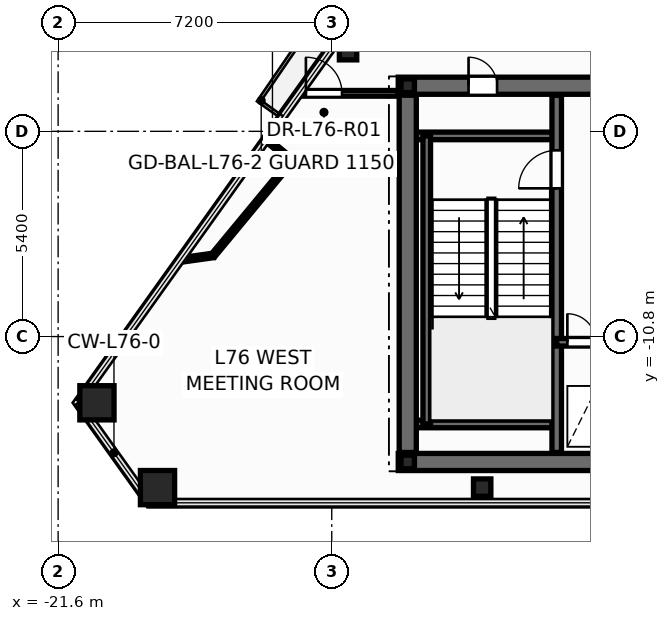
"""IFC4 building model, lengths in metres.
Left out: names, types, materials, properties, quantities, classifications, styles, units other than length and angle.
Written with IfcOpenShell. Run it as: python <this file> out.ifc"""

import sys

from ifc_helpers import new_model, si_unit, direction, frame, frame_2d, origin, origin_2d, place, context, subcontext, project, spatial, rectangle, hollow_rectangle, hollow_circle, i_section, extrude, element, fill, save


model = new_model("IFC4")
c1 = context("Model", 3, precision=1e-05, world=origin(), true_north=direction((0.0, 1.0)))
c2 = subcontext(c1, "Body", "Model", "MODEL_VIEW")
j1 = project(units=[si_unit("LENGTHUNIT", "METRE"), si_unit("PLANEANGLEUNIT", "RADIAN")], contexts=[c1])
p1 = place(None, origin())
s1 = spatial("IfcSite", under=j1, at=p1, CompositionType="ELEMENT")
p2 = place(p1, origin())
s2 = spatial("IfcBuilding", under=s1, at=p2, CompositionType="ELEMENT")
p3 = place(p2, frame((0.0, 0.0, 289.2)))
s3 = spatial("IfcBuildingStorey", under=s2, at=p3, CompositionType="ELEMENT", Elevation=289.2)
for number, where, z_axis, x_axis in (
    (1, (-20.579, -12.543, 0.0), (0.0, 0.0, 1.0), (1.0, 0.0, 0.0)),
    (2, (-18.985, -14.774, 0.0), (0.0, 0.0, 1.0), (1.0, 0.0, 0.0)),
):
    element("IfcColumn", number, at=place(p3, frame(where, z_axis=z_axis, x_axis=x_axis)), inside=s3, PredefinedType="COLUMN", context=c2, shape_type="SweptSolid", body=[
        extrude(hollow_rectangle(XDim=0.9, YDim=0.9, WallThickness=0.04, at=origin_2d()), origin(), (0.0, 0.0, 1.0), 4.2),
    ])
for number, where, z_axis, x_axis in (
    (3, (-10.442, -14.774, 0.0), (0.0, 0.0, 1.0), (1.0, 0.0, 0.0)),
    (4, (-13.97, -3.292, 0.0), (0.0, 0.0, 1.0), (1.0, 0.0, 0.0)),
):
    element("IfcColumn", number, at=place(p3, frame(where, z_axis=z_axis, x_axis=x_axis)), inside=s3, PredefinedType="COLUMN", context=c2, shape_type="SweptSolid", body=[
        extrude(hollow_circle(Radius=0.229, WallThickness=0.016, at=origin_2d()), origin(), (0.0, 0.0, 1.0), 4.2),
    ])
for number, where, z_axis, x_axis in (
    (5, (-12.4, -14.1, 0.0), (0.0, 0.0, 1.0), (1.0, 0.0, 0.0)),
    (6, (-12.4, -4.2, 0.0), (0.0, 0.0, 1.0), (1.0, 0.0, 0.0)),
):
    element("IfcColumn", number, at=place(p3, frame(where, z_axis=z_axis, x_axis=x_axis)), inside=s3, PredefinedType="COLUMN", context=c2, shape_type="SweptSolid", body=[
        extrude(i_section(OverallWidth=0.352, OverallDepth=0.359, WebThickness=0.018, FlangeThickness=0.026, at=origin_2d()), origin(), (0.0, 0.0, 1.0), 4.2),
    ])
p4 = place(p3, frame((-12.65, -14.1, 0.0), z_axis=(0.0, 0.0, 1.0), x_axis=(1.0, 0.0, 0.0)))
e7 = element("IfcWall", 7, at=p4, inside=s3, PredefinedType="SHEAR", context=c2, shape_type="SweptSolid", body=[
    extrude(rectangle(XDim=25.3, YDim=0.45, at=frame_2d((12.65, 0.0))), origin(), (0.0, 0.0, 1.0), 4.2),
])
p5 = place(p3, frame((-12.65, -4.2, 0.0), z_axis=(0.0, 0.0, 1.0), x_axis=(1.0, 0.0, 0.0)))
e8 = element("IfcWall", 8, at=p5, inside=s3, PredefinedType="SHEAR", context=c2, shape_type="SweptSolid", body=[
    extrude(rectangle(XDim=25.3, YDim=0.45, at=frame_2d((12.65, 0.0))), origin(), (0.0, 0.0, 1.0), 4.2),
])
p6 = place(p5, frame((1.85, 0.0, 0.0)))
e9 = element("IfcOpeningElement", 9, at=p6, cuts=e8, PredefinedType="OPENING", context=c2, shape_type="SweptSolid", body=[
    extrude(rectangle(XDim=0.756, YDim=2.054, at=frame_2d((0.375, 1.027))), frame((0.0, 0.235, 0.0), z_axis=(0.0, -1.0, 0.0), x_axis=(1.0, 0.0, 0.0)), (0.0, 0.0, 1.0), 0.47),
])
p7 = place(p5, frame((21.85, 0.0, 0.0)))
e10 = element("IfcOpeningElement", 10, at=p7, cuts=e8, PredefinedType="OPENING", context=c2, shape_type="SweptSolid", body=[
    extrude(rectangle(XDim=0.756, YDim=2.054, at=frame_2d((0.375, 1.027))), frame((0.0, 0.235, 0.0), z_axis=(0.0, -1.0, 0.0), x_axis=(1.0, 0.0, 0.0)), (0.0, 0.0, 1.0), 0.47),
])
p8 = place(p5, frame((23.5, 0.0, 0.0)))
e11 = element("IfcOpeningElement", 11, at=p8, cuts=e8, PredefinedType="OPENING", context=c2, shape_type="SweptSolid", body=[
    extrude(rectangle(XDim=0.756, YDim=2.054, at=frame_2d((0.375, 1.027))), frame((0.0, 0.235, 0.0), z_axis=(0.0, -1.0, 0.0), x_axis=(1.0, 0.0, 0.0)), (0.0, 0.0, 1.0), 0.47),
])
p9 = place(p5, frame((5.85, 0.0, 0.0)))
e12 = element("IfcOpeningElement", 12, at=p9, cuts=e8, PredefinedType="OPENING", context=c2, shape_type="SweptSolid", body=[
    extrude(rectangle(XDim=1.006, YDim=2.104, at=frame_2d((0.5, 1.052))), frame((0.0, 0.235, 0.0), z_axis=(0.0, -1.0, 0.0), x_axis=(1.0, 0.0, 0.0)), (0.0, 0.0, 1.0), 0.47),
])
p10 = place(p5, frame((10.35, 0.0, 0.0)))
e13 = element("IfcOpeningElement", 13, at=p10, cuts=e8, PredefinedType="OPENING", context=c2, shape_type="SweptSolid", body=[
    extrude(rectangle(XDim=1.406, YDim=2.154, at=frame_2d((0.7, 1.077))), frame((0.0, 0.235, 0.0), z_axis=(0.0, -1.0, 0.0), x_axis=(1.0, 0.0, 0.0)), (0.0, 0.0, 1.0), 0.47),
])
p11 = place(p5, frame((18.45, 0.0, 0.0)))
e14 = element("IfcOpeningElement", 14, at=p11, cuts=e8, PredefinedType="OPENING", context=c2, shape_type="SweptSolid", body=[
    extrude(rectangle(XDim=1.006, YDim=2.104, at=frame_2d((0.5, 1.052))), frame((0.0, 0.235, 0.0), z_axis=(0.0, -1.0, 0.0), x_axis=(1.0, 0.0, 0.0)), (0.0, 0.0, 1.0), 0.47),
])
for number, where, z_axis, x_axis in (
    (15, (-12.35, -5.52, 0.0), (0.0, 0.0, 1.0), (1.0, 0.0, 0.0)),
    (16, (-12.35, -13.1, 0.0), (0.0, 0.0, 1.0), (1.0, 0.0, 0.0)),
):
    element("IfcWall", number, at=place(p3, frame(where, z_axis=z_axis, x_axis=x_axis)), inside=s3, PredefinedType="SOLIDWALL", context=c2, shape_type="SweptSolid", body=[
        extrude(rectangle(XDim=3.87, YDim=0.2, at=frame_2d((1.935, 0.0))), origin(), (0.0, 0.0, 1.0), 4.2),
    ])
p12 = place(p3, frame((-11.9, -13.1, 0.0), z_axis=(0.0, 0.0, 1.0), x_axis=(0.0, 1.0, 0.0)))
e17 = element("IfcWall", 17, at=p12, inside=s3, PredefinedType="SOLIDWALL", context=c2, shape_type="SweptSolid", body=[
    extrude(rectangle(XDim=7.58, YDim=0.2, at=frame_2d((3.79, 0.0))), origin(), (0.0, 0.0, 1.0), 4.2),
])
p13 = place(p3, frame((-8.48, -13.85, 0.0), z_axis=(0.0, 0.0, 1.0), x_axis=(0.0, 1.0, 0.0)))
e18 = element("IfcWall", 18, at=p13, inside=s3, PredefinedType="SHEAR", context=c2, shape_type="SweptSolid", body=[
    extrude(rectangle(XDim=9.4, YDim=0.25, at=frame_2d((4.7, 0.0))), origin(), (0.0, 0.0, 1.0), 4.2),
])
p14 = place(p13, frame((6.95, 0.0, 0.0)))
e19 = element("IfcOpeningElement", 19, at=p14, cuts=e18, PredefinedType="OPENING", context=c2, shape_type="SweptSolid", body=[
    extrude(rectangle(XDim=1.006, YDim=2.104, at=frame_2d((0.5, 1.052))), frame((0.0, 0.135, 0.0), z_axis=(0.0, -1.0, 0.0), x_axis=(1.0, 0.0, 0.0)), (0.0, 0.0, 1.0), 0.27),
])
p15 = place(p3, frame((-8.48, -10.95, 0.0), z_axis=(0.0, 0.0, 1.0), x_axis=(1.0, 0.0, 0.0)))
e20 = element("IfcWall", 20, at=p15, inside=s3, PredefinedType="SOLIDWALL", context=c2, shape_type="SweptSolid", body=[
    extrude(rectangle(XDim=3.36, YDim=0.2, at=frame_2d((1.68, 0.0))), origin(), (0.0, 0.0, 1.0), 4.2),
])
p16 = place(p15, frame((0.28, 0.0, 0.0)))
e21 = element("IfcOpeningElement", 21, at=p16, cuts=e20, PredefinedType="OPENING", context=c2, shape_type="SweptSolid", body=[
    extrude(rectangle(XDim=0.756, YDim=2.054, at=frame_2d((0.375, 1.027))), frame((0.0, 0.11, 0.0), z_axis=(0.0, -1.0, 0.0), x_axis=(1.0, 0.0, 0.0)), (0.0, 0.0, 1.0), 0.22),
])
p17 = place(p15, frame((1.85, 0.0, 0.0)))
e22 = element("IfcOpeningElement", 22, at=p17, cuts=e20, PredefinedType="OPENING", context=c2, shape_type="SweptSolid", body=[
    extrude(rectangle(XDim=1.106, YDim=2.104, at=frame_2d((0.55, 1.052))), frame((0.0, 0.11, 0.0), z_axis=(0.0, -1.0, 0.0), x_axis=(1.0, 0.0, 0.0)), (0.0, 0.0, 1.0), 0.22),
])
p18 = place(p3, frame((-12.4, -13.85, 0.0), z_axis=(0.0, 0.0, 1.0), x_axis=(0.0, 1.0, 0.0)))
e23 = element("IfcWall", 23, at=p18, inside=s3, PredefinedType="SHEAR", context=c2, shape_type="SweptSolid", body=[
    extrude(rectangle(XDim=9.4, YDim=0.45, at=frame_2d((4.7, 0.0))), origin(), (0.0, 0.0, 1.0), 4.2),
])
p19 = place(p3, frame((-15.453, -6.164, 0.0), z_axis=(0.0, 0.0, 1.0), x_axis=(-0.63764463782, -0.770330653589, 0.0)))
e24 = element("IfcWall", 24, at=p19, inside=s3, PredefinedType="PARTITIONING", context=c2, shape_type="SweptSolid", body=[
    extrude(rectangle(XDim=3.248, YDim=0.12, at=frame_2d((1.624, 0.0))), origin(), (0.0, 0.0, 1.0), 3.92),
])
p20 = place(p3, frame((-15.254, -4.4, 0.0), z_axis=(0.0, 0.0, 1.0), x_axis=(1.0, 0.0, 0.0)))
e25 = element("IfcWall", 25, at=p20, inside=s3, PredefinedType="PARTITIONING", context=c2, shape_type="SweptSolid", body=[
    extrude(rectangle(XDim=2.602, YDim=0.15, at=frame_2d((1.301, 0.0))), origin(), (0.0, 0.0, 1.0), 2.895),
])
p21 = place(p20, frame((0.174, 0.0, 0.0)))
e26 = element("IfcOpeningElement", 26, at=p21, cuts=e25, PredefinedType="OPENING", context=c2, shape_type="SweptSolid", body=[
    extrude(rectangle(XDim=0.956, YDim=2.104, at=frame_2d((0.475, 1.052))), frame((0.0, 0.085, 0.0), z_axis=(0.0, -1.0, 0.0), x_axis=(1.0, 0.0, 0.0)), (0.0, 0.0, 1.0), 0.17),
])
p22 = place(p3, frame((-17.523, -8.666, 0.0), z_axis=(0.0, 0.0, 1.0), x_axis=(-0.990225952564, -0.139472444839, 0.0)))
e27 = element("IfcWall", 27, at=p22, inside=s3, PredefinedType="PARTITIONING", context=c2, shape_type="SweptSolid", body=[
    extrude(rectangle(XDim=0.859, YDim=0.12, at=frame_2d((0.43, 0.0))), origin(), (0.0, 0.0, 1.0), 3.438),
])
p23 = place(p3, frame((-16.112, -5.618, 0.0), z_axis=(0.0, 0.0, 1.0), x_axis=(0.770181697766, -0.637824546742, 0.0)))
e28 = element("IfcWall", 28, at=p23, inside=s3, PredefinedType="PARTITIONING", context=c2, shape_type="SweptSolid", body=[
    extrude(rectangle(XDim=0.856, YDim=0.12, at=frame_2d((0.428, 0.0))), origin(), (0.0, 0.0, 1.0), 3.438),
])
p24 = place(p14, origin())
e29 = element("IfcDoor", 29, at=p24, inside=s3, OperationType="SINGLE_SWING_LEFT", PredefinedType="DOOR", context=c2, shape_type="SweptSolid", body=[
    extrude(rectangle(XDim=1.0, YDim=2.1, at=frame_2d((0.5, 1.05))), frame((0.0, 0.025, 0.0), z_axis=(0.0, -1.0, 0.0), x_axis=(1.0, 0.0, 0.0)), (0.0, 0.0, 1.0), 0.05),
])
fill(e19, e29)
p25 = place(p16, origin())
e30 = element("IfcDoor", 30, at=p25, inside=s3, OperationType="SINGLE_SWING_LEFT", PredefinedType="DOOR", context=c2, shape_type="SweptSolid", body=[
    extrude(rectangle(XDim=0.75, YDim=2.05, at=frame_2d((0.375, 1.025))), frame((0.0, 0.025, 0.0), z_axis=(0.0, -1.0, 0.0), x_axis=(1.0, 0.0, 0.0)), (0.0, 0.0, 1.0), 0.05),
])
fill(e21, e30)
p26 = place(p6, origin())
e31 = element("IfcDoor", 31, at=p26, inside=s3, OperationType="SINGLE_SWING_LEFT", PredefinedType="DOOR", context=c2, shape_type="SweptSolid", body=[
    extrude(rectangle(XDim=0.75, YDim=2.05, at=frame_2d((0.375, 1.025))), frame((0.0, 0.025, 0.0), z_axis=(0.0, -1.0, 0.0), x_axis=(1.0, 0.0, 0.0)), (0.0, 0.0, 1.0), 0.05),
])
fill(e9, e31)
p27 = place(p21, origin())
e32 = element("IfcDoor", 32, at=p27, inside=s3, OperationType="SINGLE_SWING_LEFT", PredefinedType="DOOR", context=c2, shape_type="SweptSolid", body=[
    extrude(rectangle(XDim=0.95, YDim=2.1, at=frame_2d((0.475, 1.05))), frame((0.0, 0.025, 0.0), z_axis=(0.0, -1.0, 0.0), x_axis=(1.0, 0.0, 0.0)), (0.0, 0.0, 1.0), 0.05),
])
fill(e26, e32)
save(model, sys.argv[1])
